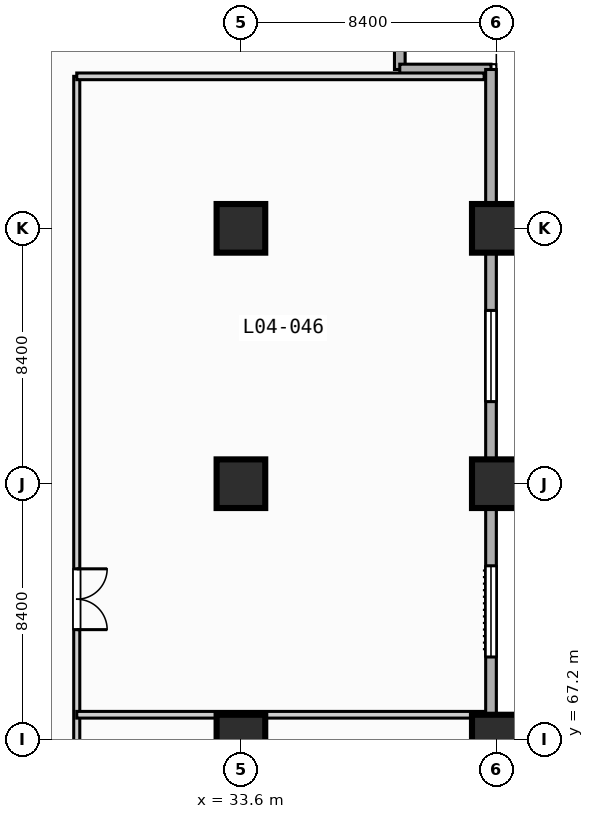
"""IFC4 building model, lengths in metres.
Left out: names, types, materials, properties, quantities, classifications, styles, units other than length and angle.
Written with IfcOpenShell. Run it as: python <this file> out.ifc"""

import sys

from ifc_helpers import new_model, si_unit, direction, frame, frame_2d, origin, origin_2d, place, context, subcontext, project, spatial, rectangle, extrude, element, fill, save


model = new_model("IFC4")
c1 = context("Model", 3, precision=1e-05, world=origin(), true_north=direction((0.0, 1.0)))
c2 = subcontext(c1, "Body", "Model", "MODEL_VIEW")
j1 = project(units=[si_unit("LENGTHUNIT", "METRE"), si_unit("PLANEANGLEUNIT", "RADIAN")], contexts=[c1])
p1 = place(None, origin())
s1 = spatial("IfcSite", under=j1, at=p1, CompositionType="ELEMENT")
p2 = place(p1, origin())
s2 = spatial("IfcBuilding", under=s1, at=p2, CompositionType="ELEMENT")
p3 = place(p2, frame((0.0, 0.0, 20.8)))
s3 = spatial("IfcBuildingStorey", under=s2, at=p3, CompositionType="ELEMENT", Elevation=20.8)
for number, where, z_axis, x_axis in (
    (1, (33.6, 67.2, 0.0), (0.0, 0.0, 1.0), (1.0, 0.0, 0.0)),
    (2, (33.6, 75.6, 0.0), (0.0, 0.0, 1.0), (1.0, 0.0, 0.0)),
    (3, (33.6, 84.0, 0.0), (0.0, 0.0, 1.0), (1.0, 0.0, 0.0)),
    (4, (42.0, 67.2, 0.0), (0.0, 0.0, 1.0), (1.0, 0.0, 0.0)),
    (5, (42.0, 75.6, 0.0), (0.0, 0.0, 1.0), (1.0, 0.0, 0.0)),
    (6, (42.0, 84.0, 0.0), (0.0, 0.0, 1.0), (1.0, 0.0, 0.0)),
):
    element("IfcColumn", number, at=place(p3, frame(where, z_axis=z_axis, x_axis=x_axis)), inside=s3, PredefinedType="COLUMN", context=c2, shape_type="SweptSolid", body=[
        extrude(rectangle(XDim=1.6, YDim=1.6, at=origin_2d()), origin(), (0.0, 0.0, 1.0), 5.2),
    ])
for number, where, z_axis, x_axis in (
    (7, (38.825, 92.225, 0.0), (0.0, 0.0, 1.0), (0.0, -1.0, 0.0)),
    (8, (38.825, 89.225, 0.0), (0.0, 0.0, 1.0), (1.0, 0.0, 0.0)),
):
    element("IfcWall", number, at=place(p3, frame(where, z_axis=z_axis, x_axis=x_axis)), inside=s3, PredefinedType="STANDARD", context=c2, shape_type="SweptSolid", body=[
        extrude(rectangle(XDim=3.0, YDim=0.35, at=frame_2d((1.5, 0.0))), origin(), (0.0, 0.0, 1.0), 4.75),
    ])
p4 = place(p3, frame((41.825, 89.225, 0.0), z_axis=(0.0, 0.0, 1.0), x_axis=(0.0, -1.0, 0.0)))
e9 = element("IfcWall", 9, at=p4, inside=s3, PredefinedType="STANDARD", context=c2, shape_type="SweptSolid", body=[
    extrude(rectangle(XDim=47.4, YDim=0.35, at=frame_2d((23.7, 0.0))), origin(), (0.0, 0.0, 1.0), 4.75),
])
p5 = place(p4, frame((33.125, 0.0, 0.85)))
e10 = element("IfcOpeningElement", 10, at=p5, cuts=e9, PredefinedType="OPENING", context=c2, shape_type="SweptSolid", body=[
    extrude(rectangle(XDim=3.0, YDim=2.4, at=frame_2d((1.5, 1.2))), frame((0.0, 0.185, 0.0), z_axis=(0.0, -1.0, 0.0), x_axis=(1.0, 0.0, 0.0)), (0.0, 0.0, 1.0), 0.37),
])
p6 = place(p4, frame((24.725, 0.0, 0.85)))
e11 = element("IfcOpeningElement", 11, at=p6, cuts=e9, PredefinedType="OPENING", context=c2, shape_type="SweptSolid", body=[
    extrude(rectangle(XDim=3.0, YDim=2.4, at=frame_2d((1.5, 1.2))), frame((0.0, 0.185, 0.0), z_axis=(0.0, -1.0, 0.0), x_axis=(1.0, 0.0, 0.0)), (0.0, 0.0, 1.0), 0.37),
])
p7 = place(p4, frame((16.325, 0.0, 0.85)))
e12 = element("IfcOpeningElement", 12, at=p7, cuts=e9, PredefinedType="OPENING", context=c2, shape_type="SweptSolid", body=[
    extrude(rectangle(XDim=3.0, YDim=2.4, at=frame_2d((1.5, 1.2))), frame((0.0, 0.185, 0.0), z_axis=(0.0, -1.0, 0.0), x_axis=(1.0, 0.0, 0.0)), (0.0, 0.0, 1.0), 0.37),
])
p8 = place(p4, frame((7.925, 0.0, 0.85)))
e13 = element("IfcOpeningElement", 13, at=p8, cuts=e9, PredefinedType="OPENING", context=c2, shape_type="SweptSolid", body=[
    extrude(rectangle(XDim=3.0, YDim=2.4, at=frame_2d((1.5, 1.2))), frame((0.0, 0.185, 0.0), z_axis=(0.0, -1.0, 0.0), x_axis=(1.0, 0.0, 0.0)), (0.0, 0.0, 1.0), 0.37),
])
p9 = place(p3, frame((28.2, 50.4, 0.0), z_axis=(0.0, 0.0, 1.0), x_axis=(0.0, 1.0, 0.0)))
e14 = element("IfcWall", 14, at=p9, inside=s3, PredefinedType="PARTITIONING", context=c2, shape_type="SweptSolid", body=[
    extrude(rectangle(XDim=38.6, YDim=0.2, at=frame_2d((19.3, 0.0))), origin(), (0.0, 0.0, 1.0), 4.75),
])
p10 = place(p9, frame((2.8, 0.0, 0.0)))
e15 = element("IfcOpeningElement", 15, at=p10, cuts=e14, PredefinedType="OPENING", context=c2, shape_type="SweptSolid", body=[
    extrude(rectangle(XDim=2.0, YDim=2.15, at=frame_2d((1.0, 1.075))), frame((0.0, 0.11, 0.0), z_axis=(0.0, -1.0, 0.0), x_axis=(1.0, 0.0, 0.0)), (0.0, 0.0, 1.0), 0.22),
])
p11 = place(p9, frame((20.4, 0.0, 0.0)))
e16 = element("IfcOpeningElement", 16, at=p11, cuts=e14, PredefinedType="OPENING", context=c2, shape_type="SweptSolid", body=[
    extrude(rectangle(XDim=2.0, YDim=2.15, at=frame_2d((1.0, 1.075))), frame((0.0, 0.11, 0.0), z_axis=(0.0, -1.0, 0.0), x_axis=(1.0, 0.0, 0.0)), (0.0, 0.0, 1.0), 0.22),
])
for number, where, z_axis, x_axis in (
    (17, (28.2, 68.0, 0.0), (0.0, 0.0, 1.0), (1.0, 0.0, 0.0)),
    (18, (28.2, 89.0, 0.0), (0.0, 0.0, 1.0), (1.0, 0.0, 0.0)),
):
    element("IfcWall", number, at=place(p3, frame(where, z_axis=z_axis, x_axis=x_axis)), inside=s3, PredefinedType="PARTITIONING", context=c2, shape_type="SweptSolid", body=[
        extrude(rectangle(XDim=13.4, YDim=0.22, at=frame_2d((6.7, 0.0))), origin(), (0.0, 0.0, 1.0), 4.75),
    ])
p12 = place(p7, origin())
e19 = element("IfcWindow", 19, at=p12, inside=s3, PartitioningType="SINGLE_PANEL", PredefinedType="WINDOW", context=c2, shape_type="SweptSolid", body=[
    extrude(rectangle(XDim=3.0, YDim=2.4, at=frame_2d((1.5, 1.2))), frame((0.0, 0.03, 0.0), z_axis=(0.0, -1.0, 0.0), x_axis=(1.0, 0.0, 0.0)), (0.0, 0.0, 1.0), 0.06),
])
fill(e12, e19)
p13 = place(p8, origin())
e20 = element("IfcWindow", 20, at=p13, inside=s3, PartitioningType="SINGLE_PANEL", PredefinedType="WINDOW", context=c2, shape_type="SweptSolid", body=[
    extrude(rectangle(XDim=3.0, YDim=2.4, at=frame_2d((1.5, 1.2))), frame((0.0, 0.03, 0.0), z_axis=(0.0, -1.0, 0.0), x_axis=(1.0, 0.0, 0.0)), (0.0, 0.0, 1.0), 0.06),
])
fill(e13, e20)
p14 = place(p11, origin())
e21 = element("IfcDoor", 21, at=p14, inside=s3, OperationType="SINGLE_SWING_RIGHT", PredefinedType="DOOR", context=c2, shape_type="SweptSolid", body=[
    extrude(rectangle(XDim=2.0, YDim=2.15, at=frame_2d((1.0, 1.075))), frame((0.0, 0.025, 0.0), z_axis=(0.0, -1.0, 0.0), x_axis=(1.0, 0.0, 0.0)), (0.0, 0.0, 1.0), 0.05),
])
fill(e16, e21)
save(model, sys.argv[1])
